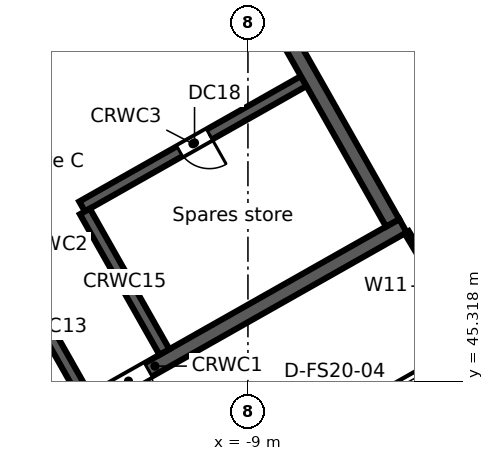
"""IFC4 building model, lengths in metres.
Left out: names, types, materials, properties, quantities, classifications, styles, units other than length and angle.
Written with IfcOpenShell. Run it as: python <this file> out.ifc"""

import sys

from ifc_helpers import new_model, si_unit, direction, frame, frame_2d, origin, place, context, subcontext, project, spatial, rectangle, extrude, element, fill, save


model = new_model("IFC4")
c1 = context("Model", 3, precision=1e-05, world=origin(), true_north=direction((0.0, 1.0)))
c2 = subcontext(c1, "Body", "Model", "MODEL_VIEW")
j1 = project(units=[si_unit("LENGTHUNIT", "METRE"), si_unit("PLANEANGLEUNIT", "RADIAN")], contexts=[c1])
p1 = place(None, origin())
s1 = spatial("IfcSite", under=j1, at=p1, CompositionType="ELEMENT")
p2 = place(p1, origin())
s2 = spatial("IfcBuilding", under=s1, at=p2, CompositionType="ELEMENT")
p3 = place(p2, frame((0.0, 0.0, 304.5)))
s3 = spatial("IfcBuildingStorey", under=s2, at=p3, CompositionType="ELEMENT", Elevation=304.5)
p4 = place(p3, frame((-58.732, 38.771, 0.0), z_axis=(0.0, 0.0, 1.0), x_axis=(0.870355615581, 0.492423702137, 0.0)))
e1 = element("IfcWall", 1, at=p4, inside=s3, PredefinedType="STANDARD", context=c2, shape_type="SweptSolid", body=[
    extrude(rectangle(XDim=64.052, YDim=0.25, at=frame_2d((32.026, 0.0))), origin(), (0.0, 0.0, 1.0), 3.52),
])
p5 = place(p4, frame((61.259, 0.0, 0.8)))
e2 = element("IfcOpeningElement", 2, at=p5, cuts=e1, PredefinedType="OPENING", context=c2, shape_type="SweptSolid", body=[
    extrude(rectangle(XDim=2.4, YDim=2.2, at=frame_2d((1.2, 1.1))), frame((0.0, 0.135, 0.0), z_axis=(0.0, -1.0, 0.0), x_axis=(1.0, 0.0, 0.0)), (0.0, 0.0, 1.0), 0.27),
])
p6 = place(p4, frame((58.216, 0.0, 0.8)))
e3 = element("IfcOpeningElement", 3, at=p6, cuts=e1, PredefinedType="OPENING", context=c2, shape_type="SweptSolid", body=[
    extrude(rectangle(XDim=2.4, YDim=2.2, at=frame_2d((1.2, 1.1))), frame((0.0, 0.135, 0.0), z_axis=(0.0, -1.0, 0.0), x_axis=(1.0, 0.0, 0.0)), (0.0, 0.0, 1.0), 0.27),
])
p7 = place(p4, frame((55.173, 0.0, 0.8)))
e4 = element("IfcOpeningElement", 4, at=p7, cuts=e1, PredefinedType="OPENING", context=c2, shape_type="SweptSolid", body=[
    extrude(rectangle(XDim=2.4, YDim=2.2, at=frame_2d((1.2, 1.1))), frame((0.0, 0.135, 0.0), z_axis=(0.0, -1.0, 0.0), x_axis=(1.0, 0.0, 0.0)), (0.0, 0.0, 1.0), 0.27),
])
p8 = place(p4, frame((52.129, 0.0, 0.8)))
e5 = element("IfcOpeningElement", 5, at=p8, cuts=e1, PredefinedType="OPENING", context=c2, shape_type="SweptSolid", body=[
    extrude(rectangle(XDim=2.4, YDim=2.2, at=frame_2d((1.2, 1.1))), frame((0.0, 0.135, 0.0), z_axis=(0.0, -1.0, 0.0), x_axis=(1.0, 0.0, 0.0)), (0.0, 0.0, 1.0), 0.27),
])
p9 = place(p4, frame((49.086, 0.0, 0.8)))
e6 = element("IfcOpeningElement", 6, at=p9, cuts=e1, PredefinedType="OPENING", context=c2, shape_type="SweptSolid", body=[
    extrude(rectangle(XDim=2.4, YDim=2.2, at=frame_2d((1.2, 1.1))), frame((0.0, 0.135, 0.0), z_axis=(0.0, -1.0, 0.0), x_axis=(1.0, 0.0, 0.0)), (0.0, 0.0, 1.0), 0.27),
])
p10 = place(p4, frame((46.043, 0.0, 0.8)))
e7 = element("IfcOpeningElement", 7, at=p10, cuts=e1, PredefinedType="OPENING", context=c2, shape_type="SweptSolid", body=[
    extrude(rectangle(XDim=2.4, YDim=2.2, at=frame_2d((1.2, 1.1))), frame((0.0, 0.135, 0.0), z_axis=(0.0, -1.0, 0.0), x_axis=(1.0, 0.0, 0.0)), (0.0, 0.0, 1.0), 0.27),
])
p11 = place(p4, frame((43.0, 0.0, 0.8)))
e8 = element("IfcOpeningElement", 8, at=p11, cuts=e1, PredefinedType="OPENING", context=c2, shape_type="SweptSolid", body=[
    extrude(rectangle(XDim=2.4, YDim=2.2, at=frame_2d((1.2, 1.1))), frame((0.0, 0.135, 0.0), z_axis=(0.0, -1.0, 0.0), x_axis=(1.0, 0.0, 0.0)), (0.0, 0.0, 1.0), 0.27),
])
p12 = place(p4, frame((39.956, 0.0, 0.8)))
e9 = element("IfcOpeningElement", 9, at=p12, cuts=e1, PredefinedType="OPENING", context=c2, shape_type="SweptSolid", body=[
    extrude(rectangle(XDim=2.4, YDim=2.2, at=frame_2d((1.2, 1.1))), frame((0.0, 0.135, 0.0), z_axis=(0.0, -1.0, 0.0), x_axis=(1.0, 0.0, 0.0)), (0.0, 0.0, 1.0), 0.27),
])
p13 = place(p4, frame((36.913, 0.0, 0.8)))
e10 = element("IfcOpeningElement", 10, at=p13, cuts=e1, PredefinedType="OPENING", context=c2, shape_type="SweptSolid", body=[
    extrude(rectangle(XDim=2.4, YDim=2.2, at=frame_2d((1.2, 1.1))), frame((0.0, 0.135, 0.0), z_axis=(0.0, -1.0, 0.0), x_axis=(1.0, 0.0, 0.0)), (0.0, 0.0, 1.0), 0.27),
])
p14 = place(p4, frame((33.87, 0.0, 0.8)))
e11 = element("IfcOpeningElement", 11, at=p14, cuts=e1, PredefinedType="OPENING", context=c2, shape_type="SweptSolid", body=[
    extrude(rectangle(XDim=2.4, YDim=2.2, at=frame_2d((1.2, 1.1))), frame((0.0, 0.135, 0.0), z_axis=(0.0, -1.0, 0.0), x_axis=(1.0, 0.0, 0.0)), (0.0, 0.0, 1.0), 0.27),
])
p15 = place(p4, frame((30.826, 0.0, 0.8)))
e12 = element("IfcOpeningElement", 12, at=p15, cuts=e1, PredefinedType="OPENING", context=c2, shape_type="SweptSolid", body=[
    extrude(rectangle(XDim=2.4, YDim=2.2, at=frame_2d((1.2, 1.1))), frame((0.0, 0.135, 0.0), z_axis=(0.0, -1.0, 0.0), x_axis=(1.0, 0.0, 0.0)), (0.0, 0.0, 1.0), 0.27),
])
p16 = place(p4, frame((27.783, 0.0, 0.8)))
e13 = element("IfcOpeningElement", 13, at=p16, cuts=e1, PredefinedType="OPENING", context=c2, shape_type="SweptSolid", body=[
    extrude(rectangle(XDim=2.4, YDim=2.2, at=frame_2d((1.2, 1.1))), frame((0.0, 0.135, 0.0), z_axis=(0.0, -1.0, 0.0), x_axis=(1.0, 0.0, 0.0)), (0.0, 0.0, 1.0), 0.27),
])
p17 = place(p4, frame((24.74, 0.0, 0.8)))
e14 = element("IfcOpeningElement", 14, at=p17, cuts=e1, PredefinedType="OPENING", context=c2, shape_type="SweptSolid", body=[
    extrude(rectangle(XDim=2.4, YDim=2.2, at=frame_2d((1.2, 1.1))), frame((0.0, 0.135, 0.0), z_axis=(0.0, -1.0, 0.0), x_axis=(1.0, 0.0, 0.0)), (0.0, 0.0, 1.0), 0.27),
])
p18 = place(p4, frame((21.696, 0.0, 0.8)))
e15 = element("IfcOpeningElement", 15, at=p18, cuts=e1, PredefinedType="OPENING", context=c2, shape_type="SweptSolid", body=[
    extrude(rectangle(XDim=2.4, YDim=2.2, at=frame_2d((1.2, 1.1))), frame((0.0, 0.135, 0.0), z_axis=(0.0, -1.0, 0.0), x_axis=(1.0, 0.0, 0.0)), (0.0, 0.0, 1.0), 0.27),
])
p19 = place(p4, frame((18.653, 0.0, 0.8)))
e16 = element("IfcOpeningElement", 16, at=p19, cuts=e1, PredefinedType="OPENING", context=c2, shape_type="SweptSolid", body=[
    extrude(rectangle(XDim=2.4, YDim=2.2, at=frame_2d((1.2, 1.1))), frame((0.0, 0.135, 0.0), z_axis=(0.0, -1.0, 0.0), x_axis=(1.0, 0.0, 0.0)), (0.0, 0.0, 1.0), 0.27),
])
p20 = place(p4, frame((15.61, 0.0, 0.8)))
e17 = element("IfcOpeningElement", 17, at=p20, cuts=e1, PredefinedType="OPENING", context=c2, shape_type="SweptSolid", body=[
    extrude(rectangle(XDim=2.4, YDim=2.2, at=frame_2d((1.2, 1.1))), frame((0.0, 0.135, 0.0), z_axis=(0.0, -1.0, 0.0), x_axis=(1.0, 0.0, 0.0)), (0.0, 0.0, 1.0), 0.27),
])
p21 = place(p4, frame((12.567, 0.0, 0.8)))
e18 = element("IfcOpeningElement", 18, at=p21, cuts=e1, PredefinedType="OPENING", context=c2, shape_type="SweptSolid", body=[
    extrude(rectangle(XDim=2.4, YDim=2.2, at=frame_2d((1.2, 1.1))), frame((0.0, 0.135, 0.0), z_axis=(0.0, -1.0, 0.0), x_axis=(1.0, 0.0, 0.0)), (0.0, 0.0, 1.0), 0.27),
])
p22 = place(p4, frame((9.523, 0.0, 0.8)))
e19 = element("IfcOpeningElement", 19, at=p22, cuts=e1, PredefinedType="OPENING", context=c2, shape_type="SweptSolid", body=[
    extrude(rectangle(XDim=2.4, YDim=2.2, at=frame_2d((1.2, 1.1))), frame((0.0, 0.135, 0.0), z_axis=(0.0, -1.0, 0.0), x_axis=(1.0, 0.0, 0.0)), (0.0, 0.0, 1.0), 0.27),
])
p23 = place(p4, frame((6.48, 0.0, 0.8)))
e20 = element("IfcOpeningElement", 20, at=p23, cuts=e1, PredefinedType="OPENING", context=c2, shape_type="SweptSolid", body=[
    extrude(rectangle(XDim=2.4, YDim=2.2, at=frame_2d((1.2, 1.1))), frame((0.0, 0.135, 0.0), z_axis=(0.0, -1.0, 0.0), x_axis=(1.0, 0.0, 0.0)), (0.0, 0.0, 1.0), 0.27),
])
p24 = place(p4, frame((3.437, 0.0, 0.8)))
e21 = element("IfcOpeningElement", 21, at=p24, cuts=e1, PredefinedType="OPENING", context=c2, shape_type="SweptSolid", body=[
    extrude(rectangle(XDim=2.4, YDim=2.2, at=frame_2d((1.2, 1.1))), frame((0.0, 0.135, 0.0), z_axis=(0.0, -1.0, 0.0), x_axis=(1.0, 0.0, 0.0)), (0.0, 0.0, 1.0), 0.27),
])
p25 = place(p4, frame((0.393, 0.0, 0.8)))
e22 = element("IfcOpeningElement", 22, at=p25, cuts=e1, PredefinedType="OPENING", context=c2, shape_type="SweptSolid", body=[
    extrude(rectangle(XDim=2.4, YDim=2.2, at=frame_2d((1.2, 1.1))), frame((0.0, 0.135, 0.0), z_axis=(0.0, -1.0, 0.0), x_axis=(1.0, 0.0, 0.0)), (0.0, 0.0, 1.0), 0.27),
])
p26 = place(p3, frame((-3.017, 46.293, 0.0), z_axis=(0.0, 0.0, 1.0), x_axis=(-0.870355474887, -0.492423950812, 0.0)))
e23 = element("IfcWall", 23, at=p26, inside=s3, PredefinedType="STANDARD", context=c2, shape_type="SweptSolid", body=[
    extrude(rectangle(XDim=40.34, YDim=0.25, at=frame_2d((20.17, 0.0))), origin(), (0.0, 0.0, 1.0), 3.52),
])
p27 = place(p26, frame((37.428, 0.0, 0.8)))
e24 = element("IfcOpeningElement", 24, at=p27, cuts=e23, PredefinedType="OPENING", context=c2, shape_type="SweptSolid", body=[
    extrude(rectangle(XDim=2.4, YDim=2.2, at=frame_2d((1.2, 1.1))), frame((0.0, 0.135, 0.0), z_axis=(0.0, -1.0, 0.0), x_axis=(1.0, 0.0, 0.0)), (0.0, 0.0, 1.0), 0.27),
])
p28 = place(p26, frame((34.372, 0.0, 0.0)))
e25 = element("IfcOpeningElement", 25, at=p28, cuts=e23, PredefinedType="OPENING", context=c2, shape_type="SweptSolid", body=[
    extrude(rectangle(XDim=1.8, YDim=2.4, at=frame_2d((0.9, 1.2))), frame((0.0, 0.135, 0.0), z_axis=(0.0, -1.0, 0.0), x_axis=(1.0, 0.0, 0.0)), (0.0, 0.0, 1.0), 0.27),
])
p29 = place(p26, frame((30.716, 0.0, 0.8)))
e26 = element("IfcOpeningElement", 26, at=p29, cuts=e23, PredefinedType="OPENING", context=c2, shape_type="SweptSolid", body=[
    extrude(rectangle(XDim=2.4, YDim=2.2, at=frame_2d((1.2, 1.1))), frame((0.0, 0.135, 0.0), z_axis=(0.0, -1.0, 0.0), x_axis=(1.0, 0.0, 0.0)), (0.0, 0.0, 1.0), 0.27),
])
p30 = place(p26, frame((27.36, 0.0, 0.8)))
e27 = element("IfcOpeningElement", 27, at=p30, cuts=e23, PredefinedType="OPENING", context=c2, shape_type="SweptSolid", body=[
    extrude(rectangle(XDim=2.4, YDim=2.2, at=frame_2d((1.2, 1.1))), frame((0.0, 0.135, 0.0), z_axis=(0.0, -1.0, 0.0), x_axis=(1.0, 0.0, 0.0)), (0.0, 0.0, 1.0), 0.27),
])
p31 = place(p26, frame((24.304, 0.0, 0.0)))
e28 = element("IfcOpeningElement", 28, at=p31, cuts=e23, PredefinedType="OPENING", context=c2, shape_type="SweptSolid", body=[
    extrude(rectangle(XDim=1.8, YDim=2.4, at=frame_2d((0.9, 1.2))), frame((0.0, 0.135, 0.0), z_axis=(0.0, -1.0, 0.0), x_axis=(1.0, 0.0, 0.0)), (0.0, 0.0, 1.0), 0.27),
])
p32 = place(p26, frame((20.648, 0.0, 0.8)))
e29 = element("IfcOpeningElement", 29, at=p32, cuts=e23, PredefinedType="OPENING", context=c2, shape_type="SweptSolid", body=[
    extrude(rectangle(XDim=2.4, YDim=2.2, at=frame_2d((1.2, 1.1))), frame((0.0, 0.135, 0.0), z_axis=(0.0, -1.0, 0.0), x_axis=(1.0, 0.0, 0.0)), (0.0, 0.0, 1.0), 0.27),
])
p33 = place(p26, frame((17.292, 0.0, 0.8)))
e30 = element("IfcOpeningElement", 30, at=p33, cuts=e23, PredefinedType="OPENING", context=c2, shape_type="SweptSolid", body=[
    extrude(rectangle(XDim=2.4, YDim=2.2, at=frame_2d((1.2, 1.1))), frame((0.0, 0.135, 0.0), z_axis=(0.0, -1.0, 0.0), x_axis=(1.0, 0.0, 0.0)), (0.0, 0.0, 1.0), 0.27),
])
p34 = place(p26, frame((14.236, 0.0, 0.0)))
e31 = element("IfcOpeningElement", 31, at=p34, cuts=e23, PredefinedType="OPENING", context=c2, shape_type="SweptSolid", body=[
    extrude(rectangle(XDim=1.8, YDim=2.4, at=frame_2d((0.9, 1.2))), frame((0.0, 0.135, 0.0), z_axis=(0.0, -1.0, 0.0), x_axis=(1.0, 0.0, 0.0)), (0.0, 0.0, 1.0), 0.27),
])
p35 = place(p26, frame((10.58, 0.0, 0.8)))
e32 = element("IfcOpeningElement", 32, at=p35, cuts=e23, PredefinedType="OPENING", context=c2, shape_type="SweptSolid", body=[
    extrude(rectangle(XDim=2.4, YDim=2.2, at=frame_2d((1.2, 1.1))), frame((0.0, 0.135, 0.0), z_axis=(0.0, -1.0, 0.0), x_axis=(1.0, 0.0, 0.0)), (0.0, 0.0, 1.0), 0.27),
])
p36 = place(p26, frame((7.224, 0.0, 0.8)))
e33 = element("IfcOpeningElement", 33, at=p36, cuts=e23, PredefinedType="OPENING", context=c2, shape_type="SweptSolid", body=[
    extrude(rectangle(XDim=2.4, YDim=2.2, at=frame_2d((1.2, 1.1))), frame((0.0, 0.135, 0.0), z_axis=(0.0, -1.0, 0.0), x_axis=(1.0, 0.0, 0.0)), (0.0, 0.0, 1.0), 0.27),
])
p37 = place(p26, frame((4.168, 0.0, 0.0)))
e34 = element("IfcOpeningElement", 34, at=p37, cuts=e23, PredefinedType="OPENING", context=c2, shape_type="SweptSolid", body=[
    extrude(rectangle(XDim=1.8, YDim=2.4, at=frame_2d((0.9, 1.2))), frame((0.0, 0.135, 0.0), z_axis=(0.0, -1.0, 0.0), x_axis=(1.0, 0.0, 0.0)), (0.0, 0.0, 1.0), 0.27),
])
p38 = place(p26, frame((0.512, 0.0, 0.8)))
e35 = element("IfcOpeningElement", 35, at=p38, cuts=e23, PredefinedType="OPENING", context=c2, shape_type="SweptSolid", body=[
    extrude(rectangle(XDim=2.4, YDim=2.2, at=frame_2d((1.2, 1.1))), frame((0.0, 0.135, 0.0), z_axis=(0.0, -1.0, 0.0), x_axis=(1.0, 0.0, 0.0)), (0.0, 0.0, 1.0), 0.27),
])
p39 = place(p3, frame((-17.975, 42.017, 0.0), z_axis=(0.0, 0.0, 1.0), x_axis=(0.87034965173, 0.492434243055, 0.0)))
e36 = element("IfcWall", 36, at=p39, inside=s3, PredefinedType="SOLIDWALL", context=c2, shape_type="SweptSolid", body=[
    extrude(rectangle(XDim=15.0, YDim=0.4, at=frame_2d((7.5, 0.0))), origin(), (0.0, 0.0, 1.0), 3.52),
])
p40 = place(p39, frame((6.1, 0.0, 0.0)))
e37 = element("IfcOpeningElement", 37, at=p40, cuts=e36, PredefinedType="OPENING", context=c2, shape_type="SweptSolid", body=[
    extrude(rectangle(XDim=1.2, YDim=2.1, at=frame_2d((0.6, 1.05))), frame((0.0, 0.21, 0.0), z_axis=(0.0, -1.0, 0.0), x_axis=(1.0, 0.0, 0.0)), (0.0, 0.0, 1.0), 0.42),
])
p41 = place(p3, frame((-13.365, 49.911, 0.0), z_axis=(0.0, 0.0, 1.0), x_axis=(0.870347618718, 0.492437836272, 0.0)))
e38 = element("IfcWall", 38, at=p41, inside=s3, PredefinedType="SOLIDWALL", context=c2, shape_type="SweptSolid", body=[
    extrude(rectangle(XDim=6.7, YDim=0.3, at=frame_2d((3.35, 0.0))), origin(), (0.0, 0.0, 1.0), 3.52),
])
p42 = place(p41, frame((2.95, 0.0, 0.0)))
e39 = element("IfcOpeningElement", 39, at=p42, cuts=e38, PredefinedType="OPENING", context=c2, shape_type="SweptSolid", body=[
    extrude(rectangle(XDim=0.9, YDim=2.1, at=frame_2d((0.45, 1.05))), frame((0.0, 0.16, 0.0), z_axis=(0.0, -1.0, 0.0), x_axis=(1.0, 0.0, 0.0)), (0.0, 0.0, 1.0), 0.32),
])
p43 = place(p3, frame((-15.618, 53.691, 0.0), z_axis=(0.0, 0.0, 1.0), x_axis=(0.870362830851, 0.492410948978, 0.0)))
e40 = element("IfcWall", 40, at=p43, inside=s3, PredefinedType="SOLIDWALL", context=c2, shape_type="SweptSolid", body=[
    extrude(rectangle(XDim=6.8, YDim=0.3, at=frame_2d((3.4, 0.0))), origin(), (0.0, 0.0, 1.0), 3.52),
])
p44 = place(p43, frame((3.4, 0.0, 0.0)))
e41 = element("IfcOpeningElement", 41, at=p44, cuts=e40, PredefinedType="OPENING", context=c2, shape_type="SweptSolid", body=[
    extrude(rectangle(XDim=0.9, YDim=2.1, at=frame_2d((0.45, 1.05))), frame((0.0, 0.16, 0.0), z_axis=(0.0, -1.0, 0.0), x_axis=(1.0, 0.0, 0.0)), (0.0, 0.0, 1.0), 0.32),
])
p45 = place(p3, frame((-24.672, 53.854, 0.0), z_axis=(0.0, 0.0, 1.0), x_axis=(0.870353598469, 0.492427267353, 0.0)))
e42 = element("IfcWall", 42, at=p45, inside=s3, PredefinedType="SOLIDWALL", context=c2, shape_type="SweptSolid", body=[
    extrude(rectangle(XDim=15.0, YDim=0.4, at=frame_2d((7.5, 0.0))), origin(), (0.0, 0.0, 1.0), 3.52),
])
p46 = place(p3, frame((-15.379, 48.599, 0.0), z_axis=(0.0, 0.0, 1.0), x_axis=(0.492422543467, -0.870356271124, 0.0)))
e43 = element("IfcWall", 43, at=p46, inside=s3, PredefinedType="SOLIDWALL", context=c2, shape_type="SweptSolid", body=[
    extrude(rectangle(XDim=4.25, YDim=0.3, at=frame_2d((2.125, 0.0))), origin(), (0.0, 0.0, 1.0), 3.52),
])
p47 = place(p3, frame((-13.291, 49.781, 0.0), z_axis=(0.0, 0.0, 1.0), x_axis=(0.492397924348, -0.870370199454, 0.0)))
e44 = element("IfcWall", 44, at=p47, inside=s3, PredefinedType="SOLIDWALL", context=c2, shape_type="SweptSolid", body=[
    extrude(rectangle(XDim=4.25, YDim=0.3, at=frame_2d((2.125, 0.0))), origin(), (0.0, 0.0, 1.0), 3.52),
])
p48 = place(p3, frame((-11.692, 60.968, 0.0), z_axis=(0.0, 0.0, 1.0), x_axis=(0.492421663121, -0.870356769198, 0.0)))
e45 = element("IfcWall", 45, at=p48, inside=s3, PredefinedType="SOLIDWALL", context=c2, shape_type="SweptSolid", body=[
    extrude(rectangle(XDim=13.2, YDim=0.4, at=frame_2d((6.6, 0.0))), origin(), (0.0, 0.0, 1.0), 3.52),
])
p49 = place(p3, frame((-4.821, 49.23, 0.0), z_axis=(0.0, 0.0, 1.0), x_axis=(0.515006587647, -0.857186219371, 0.0)))
e46 = element("IfcWall", 46, at=p49, inside=s3, PredefinedType="PARTITIONING", context=c2, shape_type="SweptSolid", body=[
    extrude(rectangle(XDim=3.303, YDim=0.125, at=frame_2d((1.651, 0.0))), origin(), (0.0, 0.0, 1.0), 2.8),
])
p50 = place(p49, frame((1.2, 0.0, 0.0)))
e47 = element("IfcOpeningElement", 47, at=p50, cuts=e46, PredefinedType="OPENING", context=c2, shape_type="SweptSolid", body=[
    extrude(rectangle(XDim=0.9, YDim=2.1, at=frame_2d((0.45, 1.05))), frame((0.0, 0.073, 0.0), z_axis=(0.0, -1.0, 0.0), x_axis=(1.0, 0.0, 0.0)), (0.0, 0.0, 1.0), 0.145),
])
p51 = place(p38, origin())
e48 = element("IfcWindow", 48, at=p51, inside=s3, PartitioningType="SINGLE_PANEL", PredefinedType="WINDOW", context=c2, shape_type="SweptSolid", body=[
    extrude(rectangle(XDim=2.4, YDim=2.2, at=frame_2d((1.2, 1.1))), frame((0.0, 0.03, 0.0), z_axis=(0.0, -1.0, 0.0), x_axis=(1.0, 0.0, 0.0)), (0.0, 0.0, 1.0), 0.06),
])
fill(e35, e48)
p52 = place(p40, frame((1.2, 0.0, 0.0), z_axis=(0.0, 0.0, 1.0), x_axis=(-1.0, 0.0, 0.0)))
e49 = element("IfcDoor", 49, at=p52, inside=s3, OperationType="SINGLE_SWING_RIGHT", PredefinedType="DOOR", context=c2, shape_type="SweptSolid", body=[
    extrude(rectangle(XDim=1.2, YDim=2.1, at=frame_2d((0.6, 1.05))), frame((0.0, 0.025, 0.0), z_axis=(0.0, -1.0, 0.0), x_axis=(1.0, 0.0, 0.0)), (0.0, 0.0, 1.0), 0.05),
])
fill(e37, e49)
p53 = place(p42, frame((0.9, 0.0, 0.0), z_axis=(0.0, 0.0, 1.0), x_axis=(-1.0, 0.0, 0.0)))
e50 = element("IfcDoor", 50, at=p53, inside=s3, OperationType="SINGLE_SWING_LEFT", PredefinedType="DOOR", context=c2, shape_type="SweptSolid", body=[
    extrude(rectangle(XDim=0.9, YDim=2.1, at=frame_2d((0.45, 1.05))), frame((0.0, 0.025, 0.0), z_axis=(0.0, -1.0, 0.0), x_axis=(1.0, 0.0, 0.0)), (0.0, 0.0, 1.0), 0.05),
])
fill(e39, e50)
save(model, sys.argv[1])
